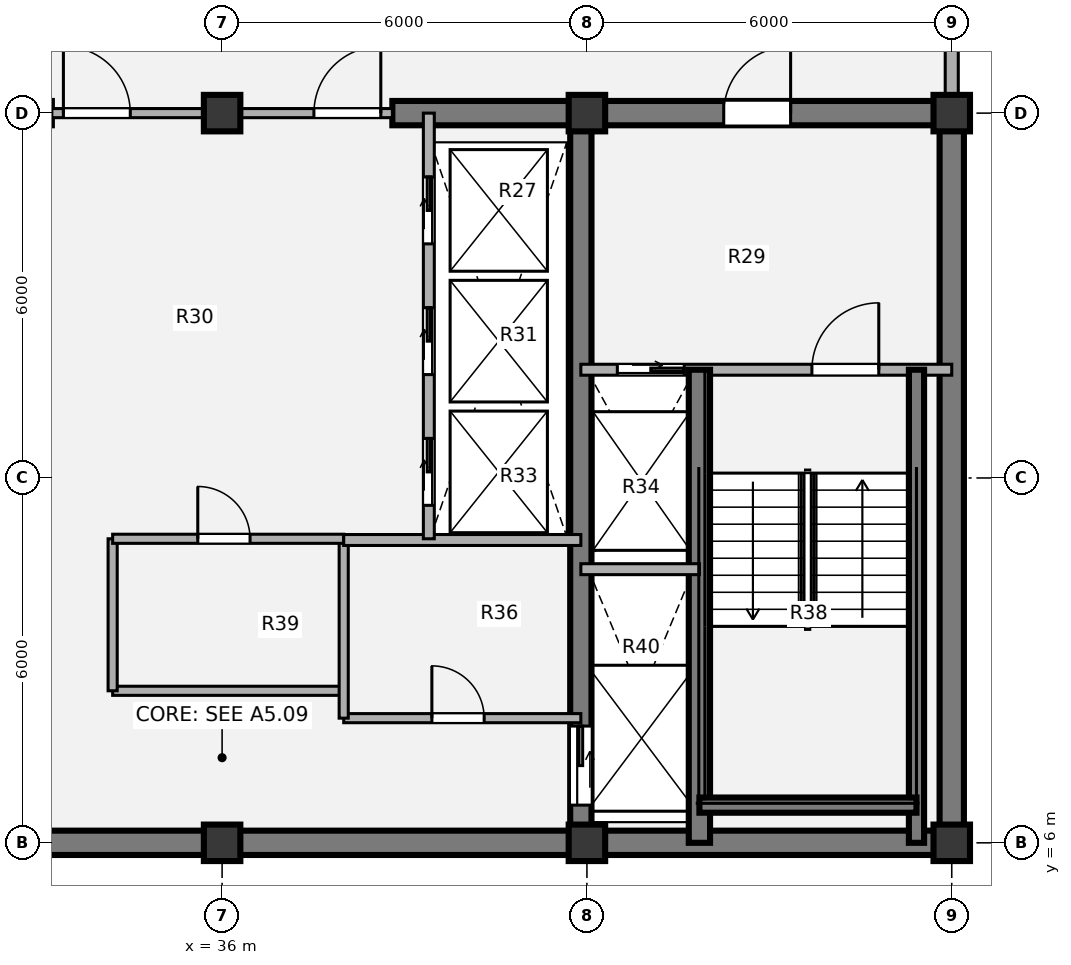
"""IFC4 building model, lengths in metres.
Left out: names, types, materials, properties, quantities, classifications, styles, units other than length and angle.
Written with IfcOpenShell. Run it as: python <this file> out.ifc"""

import sys

from ifc_helpers import new_model, si_unit, direction, frame, frame_2d, origin, origin_2d, place, context, subcontext, project, spatial, rectangle, extrude, source, transform, mapped, element, fill, save


model = new_model("IFC4")
c1 = context("Model", 3, precision=1e-05, world=origin(), true_north=direction((0.0, 1.0)))
c2 = subcontext(c1, "Body", "Model", "MODEL_VIEW")
j1 = project(units=[si_unit("LENGTHUNIT", "METRE"), si_unit("PLANEANGLEUNIT", "RADIAN")], contexts=[c1])
p1 = place(None, origin())
s1 = spatial("IfcSite", under=j1, at=p1, CompositionType="ELEMENT")
p2 = place(p1, origin())
s2 = spatial("IfcBuilding", under=s1, at=p2, CompositionType="ELEMENT")
p3 = place(p2, frame((0.0, 0.0, 238.14)))
s3 = spatial("IfcBuildingStorey", under=s2, at=p3, CompositionType="ELEMENT", Elevation=238.14)
m1 = source(origin(), c2, "Body", "SweptSolid", [
    extrude(rectangle(XDim=0.6, YDim=0.6, at=origin_2d()), origin(), (0.0, 0.0, 1.0), 3.78),
])
for number, where, z_axis, x_axis in (
    (1, (36.0, 6.0, 0.0), (0.0, 0.0, 1.0), (1.0, 0.0, 0.0)),
    (2, (42.0, 6.0, 0.0), (0.0, 0.0, 1.0), (1.0, 0.0, 0.0)),
    (3, (48.0, 6.0, 0.0), (0.0, 0.0, 1.0), (1.0, 0.0, 0.0)),
    (4, (36.0, 18.0, 0.0), (0.0, 0.0, 1.0), (1.0, 0.0, 0.0)),
    (5, (42.0, 18.0, 0.0), (0.0, 0.0, 1.0), (1.0, 0.0, 0.0)),
    (6, (48.0, 18.0, 0.0), (0.0, 0.0, 1.0), (1.0, 0.0, 0.0)),
):
    element("IfcColumn", number, at=place(p3, frame(where, z_axis=z_axis, x_axis=x_axis)), inside=s3, PredefinedType="COLUMN", context=c2, shape_type="MappedRepresentation", body=[
        mapped(m1, transform((0.0, 0.0, 0.0), x_axis=(1.0, 0.0, 0.0), y_axis=(0.0, 1.0, 0.0), z_axis=(0.0, 0.0, 1.0), scale=1.0)),
    ])
p4 = place(p3, frame((48.2, 6.0, 0.0), z_axis=(0.0, 0.0, 1.0), x_axis=(-1.0, 0.0, 0.0)))
e7 = element("IfcWall", 7, at=p4, inside=s3, PredefinedType="SHEAR", context=c2, shape_type="SweptSolid", body=[
    extrude(rectangle(XDim=24.4, YDim=0.4, at=frame_2d((12.2, 0.0))), origin(), (0.0, 0.0, 1.0), 3.78),
])
p5 = place(p3, frame((48.0, 18.0, 0.0), z_axis=(0.0, 0.0, 1.0), x_axis=(0.0, -1.0, 0.0)))
e8 = element("IfcWall", 8, at=p5, inside=s3, PredefinedType="SHEAR", context=c2, shape_type="SweptSolid", body=[
    extrude(rectangle(XDim=12.0, YDim=0.4, at=frame_2d((6.0, 0.0))), origin(), (0.0, 0.0, 1.0), 3.78),
])
p6 = place(p3, frame((38.8, 18.0, 0.0), z_axis=(0.0, 0.0, 1.0), x_axis=(1.0, 0.0, 0.0)))
e9 = element("IfcWall", 9, at=p6, inside=s3, PredefinedType="SHEAR", context=c2, shape_type="SweptSolid", body=[
    extrude(rectangle(XDim=9.4, YDim=0.4, at=frame_2d((4.7, 0.0))), origin(), (0.0, 0.0, 1.0), 3.78),
])
p7 = place(p6, frame((5.45, 0.0, 0.0)))
e10 = element("IfcOpeningElement", 10, at=p7, cuts=e9, PredefinedType="OPENING", context=c2, shape_type="SweptSolid", body=[
    extrude(rectangle(XDim=1.1, YDim=2.1, at=origin_2d()), frame((0.55, 0.21, 1.05), z_axis=(0.0, -1.0, 0.0), x_axis=(1.0, 0.0, 0.0)), (0.0, 0.0, 1.0), 0.42),
])
p8 = place(p3, frame((41.9, 18.0, 0.0), z_axis=(0.0, 0.0, 1.0), x_axis=(0.0, -1.0, 0.0)))
e11 = element("IfcWall", 11, at=p8, inside=s3, PredefinedType="SHEAR", context=c2, shape_type="SweptSolid", body=[
    extrude(rectangle(XDim=12.0, YDim=0.35, at=frame_2d((6.0, 0.0))), origin(), (0.0, 0.0, 1.0), 3.78),
])
p9 = place(p8, frame((10.08, 0.0, 0.0)))
e12 = element("IfcOpeningElement", 12, at=p9, cuts=e11, PredefinedType="OPENING", context=c2, shape_type="SweptSolid", body=[
    extrude(rectangle(XDim=1.3, YDim=2.1, at=origin_2d()), frame((0.65, 0.185, 1.05), z_axis=(0.0, -1.0, 0.0), x_axis=(1.0, 0.0, 0.0)), (0.0, 0.0, 1.0), 0.37),
])
p10 = place(p3, frame((48.0, 21.05, 0.0), z_axis=(0.0, 0.0, 1.0), x_axis=(0.0, -1.0, 0.0)))
e13 = element("IfcWall", 13, at=p10, inside=s3, PredefinedType="SOLIDWALL", context=c2, shape_type="SweptSolid", body=[
    extrude(rectangle(XDim=2.77, YDim=0.215, at=frame_2d((1.385, 0.0))), origin(), (0.0, 0.0, 1.0), 2.718),
])
p11 = place(p3, frame((34.2, 8.5, 0.0), z_axis=(0.0, 0.0, 1.0), x_axis=(1.0, 0.0, 0.0)))
e14 = element("IfcWall", 14, at=p11, inside=s3, PredefinedType="PARTITIONING", context=c2, shape_type="SweptSolid", body=[
    extrude(rectangle(XDim=3.8, YDim=0.15, at=frame_2d((1.9, 0.0))), origin(), (0.0, 0.0, 1.0), 3.5),
])
p12 = place(p3, frame((38.0, 8.05, 0.0), z_axis=(0.0, 0.0, 1.0), x_axis=(1.0, 0.0, 0.0)))
e15 = element("IfcWall", 15, at=p12, inside=s3, PredefinedType="PARTITIONING", context=c2, shape_type="SweptSolid", body=[
    extrude(rectangle(XDim=3.9, YDim=0.15, at=frame_2d((1.95, 0.0))), origin(), (0.0, 0.0, 1.0), 3.5),
])
p13 = place(p12, frame((1.45, 0.0, 0.0)))
e16 = element("IfcOpeningElement", 16, at=p13, cuts=e15, PredefinedType="OPENING", context=c2, shape_type="SweptSolid", body=[
    extrude(rectangle(XDim=0.86, YDim=2.1, at=origin_2d()), frame((0.43, 0.085, 1.05), z_axis=(0.0, -1.0, 0.0), x_axis=(1.0, 0.0, 0.0)), (0.0, 0.0, 1.0), 0.17),
])
p14 = place(p3, frame((34.2, 8.5, 0.0), z_axis=(0.0, 0.0, 1.0), x_axis=(0.0, 1.0, 0.0)))
e17 = element("IfcWall", 17, at=p14, inside=s3, PredefinedType="PARTITIONING", context=c2, shape_type="SweptSolid", body=[
    extrude(rectangle(XDim=2.5, YDim=0.15, at=frame_2d((1.25, 0.0))), origin(), (0.0, 0.0, 1.0), 3.5),
])
p15 = place(p3, frame((38.0, 8.05, 0.0), z_axis=(0.0, 0.0, 1.0), x_axis=(0.0, 1.0, 0.0)))
e18 = element("IfcWall", 18, at=p15, inside=s3, PredefinedType="PARTITIONING", context=c2, shape_type="SweptSolid", body=[
    extrude(rectangle(XDim=2.95, YDim=0.15, at=frame_2d((1.475, 0.0))), origin(), (0.0, 0.0, 1.0), 3.5),
])
p16 = place(p3, frame((34.2, 11.0, 0.0), z_axis=(0.0, 0.0, 1.0), x_axis=(1.0, 0.0, 0.0)))
e19 = element("IfcWall", 19, at=p16, inside=s3, PredefinedType="PARTITIONING", context=c2, shape_type="SweptSolid", body=[
    extrude(rectangle(XDim=3.8, YDim=0.15, at=frame_2d((1.9, 0.0))), origin(), (0.0, 0.0, 1.0), 3.5),
])
p17 = place(p16, frame((1.4, 0.0, 0.0)))
e20 = element("IfcOpeningElement", 20, at=p17, cuts=e19, PredefinedType="OPENING", context=c2, shape_type="SweptSolid", body=[
    extrude(rectangle(XDim=0.86, YDim=2.1, at=origin_2d()), frame((0.43, 0.085, 1.05), z_axis=(0.0, -1.0, 0.0), x_axis=(1.0, 0.0, 0.0)), (0.0, 0.0, 1.0), 0.17),
])
p18 = place(p3, frame((38.0, 10.98, 0.0), z_axis=(0.0, 0.0, 1.0), x_axis=(1.0, 0.0, 0.0)))
e21 = element("IfcWall", 21, at=p18, inside=s3, PredefinedType="PARTITIONING", context=c2, shape_type="SweptSolid", body=[
    extrude(rectangle(XDim=3.9, YDim=0.18, at=frame_2d((1.95, 0.0))), origin(), (0.0, 0.0, 1.0), 3.5),
])
p19 = place(p3, frame((33.2, 18.0, 0.0), z_axis=(0.0, 0.0, 1.0), x_axis=(1.0, 0.0, 0.0)))
e22 = element("IfcWall", 22, at=p19, inside=s3, PredefinedType="PARTITIONING", context=c2, shape_type="SweptSolid", body=[
    extrude(rectangle(XDim=5.6, YDim=0.15, at=frame_2d((2.8, 0.0))), origin(), (0.0, 0.0, 1.0), 2.515),
])
p20 = place(p19, frame((0.19, 0.0, 0.0)))
e23 = element("IfcOpeningElement", 23, at=p20, cuts=e22, PredefinedType="OPENING", context=c2, shape_type="SweptSolid", body=[
    extrude(rectangle(XDim=1.1, YDim=2.1, at=origin_2d()), frame((0.55, 0.085, 1.05), z_axis=(0.0, -1.0, 0.0), x_axis=(1.0, 0.0, 0.0)), (0.0, 0.0, 1.0), 0.17),
])
p21 = place(p19, frame((4.31, 0.0, 0.0)))
e24 = element("IfcOpeningElement", 24, at=p21, cuts=e22, PredefinedType="OPENING", context=c2, shape_type="SweptSolid", body=[
    extrude(rectangle(XDim=1.1, YDim=2.1, at=origin_2d()), frame((0.55, 0.085, 1.05), z_axis=(0.0, -1.0, 0.0), x_axis=(1.0, 0.0, 0.0)), (0.0, 0.0, 1.0), 0.17),
])
p22 = place(p3, frame((41.9, 13.78, 0.0), z_axis=(0.0, 0.0, 1.0), x_axis=(1.0, 0.0, 0.0)))
e25 = element("IfcWall", 25, at=p22, inside=s3, PredefinedType="PARTITIONING", context=c2, shape_type="SweptSolid", body=[
    extrude(rectangle(XDim=6.1, YDim=0.18, at=frame_2d((3.05, 0.0))), origin(), (0.0, 0.0, 1.0), 3.5),
])
p23 = place(p22, frame((0.6, 0.0, 0.0)))
e26 = element("IfcOpeningElement", 26, at=p23, cuts=e25, PredefinedType="OPENING", context=c2, shape_type="SweptSolid", body=[
    extrude(rectangle(XDim=1.1, YDim=2.1, at=origin_2d()), frame((0.55, 0.1, 1.05), z_axis=(0.0, -1.0, 0.0), x_axis=(1.0, 0.0, 0.0)), (0.0, 0.0, 1.0), 0.2),
])
p24 = place(p22, frame((3.8, 0.0, 0.0)))
e27 = element("IfcOpeningElement", 27, at=p24, cuts=e25, PredefinedType="OPENING", context=c2, shape_type="SweptSolid", body=[
    extrude(rectangle(XDim=1.1, YDim=2.1, at=origin_2d()), frame((0.55, 0.1, 1.05), z_axis=(0.0, -1.0, 0.0), x_axis=(1.0, 0.0, 0.0)), (0.0, 0.0, 1.0), 0.2),
])
p25 = place(p3, frame((43.85, 6.0, 0.0), z_axis=(0.0, 0.0, 1.0), x_axis=(0.0, 1.0, 0.0)))
e28 = element("IfcWall", 28, at=p25, inside=s3, PredefinedType="SHEAR", context=c2, shape_type="SweptSolid", body=[
    extrude(rectangle(XDim=7.78, YDim=0.35, at=frame_2d((3.89, 0.0))), origin(), (0.0, 0.0, 1.0), 3.85),
])
p26 = place(p3, frame((47.42, 6.0, 0.0), z_axis=(0.0, 0.0, 1.0), x_axis=(0.0, 1.0, 0.0)))
e29 = element("IfcWall", 29, at=p26, inside=s3, PredefinedType="SHEAR", context=c2, shape_type="SweptSolid", body=[
    extrude(rectangle(XDim=7.78, YDim=0.25, at=frame_2d((3.89, 0.0))), origin(), (0.0, 0.0, 1.0), 3.85),
])
p27 = place(p3, frame((43.85, 6.62, 0.0), z_axis=(0.0, 0.0, 1.0), x_axis=(1.0, 0.0, 0.0)))
e30 = element("IfcWall", 30, at=p27, inside=s3, PredefinedType="SHEAR", context=c2, shape_type="SweptSolid", body=[
    extrude(rectangle(XDim=3.57, YDim=0.25, at=frame_2d((1.785, 0.0))), origin(), (0.0, 0.0, 1.0), 3.85),
])
p28 = place(p3, frame((41.9, 10.5, 0.0), z_axis=(0.0, 0.0, 1.0), x_axis=(1.0, 0.0, 0.0)))
e31 = element("IfcWall", 31, at=p28, inside=s3, PredefinedType="PARTITIONING", context=c2, shape_type="SweptSolid", body=[
    extrude(rectangle(XDim=1.95, YDim=0.18, at=frame_2d((0.975, 0.0))), origin(), (0.0, 0.0, 1.0), 3.5),
])
p29 = place(p3, frame((39.4, 11.0, 0.0), z_axis=(0.0, 0.0, 1.0), x_axis=(0.0, 1.0, 0.0)))
e32 = element("IfcWall", 32, at=p29, inside=s3, PredefinedType="PARTITIONING", context=c2, shape_type="SweptSolid", body=[
    extrude(rectangle(XDim=7.0, YDim=0.18, at=frame_2d((3.5, 0.0))), origin(), (0.0, 0.0, 1.0), 3.5),
])
p30 = place(p29, frame((0.55, 0.0, 0.0)))
e33 = element("IfcOpeningElement", 33, at=p30, cuts=e32, PredefinedType="OPENING", context=c2, shape_type="SweptSolid", body=[
    extrude(rectangle(XDim=1.1, YDim=2.1, at=origin_2d()), frame((0.55, 0.1, 1.05), z_axis=(0.0, -1.0, 0.0), x_axis=(1.0, 0.0, 0.0)), (0.0, 0.0, 1.0), 0.2),
])
p31 = place(p29, frame((2.7, 0.0, 0.0)))
e34 = element("IfcOpeningElement", 34, at=p31, cuts=e32, PredefinedType="OPENING", context=c2, shape_type="SweptSolid", body=[
    extrude(rectangle(XDim=1.1, YDim=2.1, at=origin_2d()), frame((0.55, 0.1, 1.05), z_axis=(0.0, -1.0, 0.0), x_axis=(1.0, 0.0, 0.0)), (0.0, 0.0, 1.0), 0.2),
])
p32 = place(p29, frame((4.85, 0.0, 0.0)))
e35 = element("IfcOpeningElement", 35, at=p32, cuts=e32, PredefinedType="OPENING", context=c2, shape_type="SweptSolid", body=[
    extrude(rectangle(XDim=1.1, YDim=2.1, at=origin_2d()), frame((0.55, 0.1, 1.05), z_axis=(0.0, -1.0, 0.0), x_axis=(1.0, 0.0, 0.0)), (0.0, 0.0, 1.0), 0.2),
])
m2 = source(origin(), c2, "Body", "SweptSolid", [
    extrude(rectangle(XDim=0.86, YDim=2.1, at=origin_2d()), frame((0.43, 0.025, 1.05), z_axis=(0.0, -1.0, 0.0), x_axis=(1.0, 0.0, 0.0)), (0.0, 0.0, 1.0), 0.05),
])
p33 = place(p13, origin())
e36 = element("IfcDoor", 36, at=p33, inside=s3, OperationType="SINGLE_SWING_LEFT", PredefinedType="DOOR", context=c2, shape_type="MappedRepresentation", body=[
    mapped(m2, transform((0.0, 0.0, 0.0), x_axis=(1.0, 0.0, 0.0), y_axis=(0.0, 1.0, 0.0), z_axis=(0.0, 0.0, 1.0), scale=1.0)),
])
fill(e16, e36)
p34 = place(p17, origin())
e37 = element("IfcDoor", 37, at=p34, inside=s3, OperationType="SINGLE_SWING_LEFT", PredefinedType="DOOR", context=c2, shape_type="MappedRepresentation", body=[
    mapped(m2, transform((0.0, 0.0, 0.0), x_axis=(1.0, 0.0, 0.0), y_axis=(0.0, 1.0, 0.0), z_axis=(0.0, 0.0, 1.0), scale=1.0)),
])
fill(e20, e37)
m3 = source(origin(), c2, "Body", "SweptSolid", [
    extrude(rectangle(XDim=1.1, YDim=2.1, at=origin_2d()), frame((0.55, 0.025, 1.05), z_axis=(0.0, -1.0, 0.0), x_axis=(1.0, 0.0, 0.0)), (0.0, 0.0, 1.0), 0.05),
])
p35 = place(p20, origin())
e38 = element("IfcDoor", 38, at=p35, inside=s3, OperationType="SINGLE_SWING_LEFT", PredefinedType="DOOR", context=c2, shape_type="MappedRepresentation", body=[
    mapped(m3, transform((0.0, 0.0, 0.0), x_axis=(1.0, 0.0, 0.0), y_axis=(0.0, 1.0, 0.0), z_axis=(0.0, 0.0, 1.0), scale=1.0)),
])
fill(e23, e38)
p36 = place(p21, origin())
e39 = element("IfcDoor", 39, at=p36, inside=s3, OperationType="SINGLE_SWING_RIGHT", PredefinedType="DOOR", context=c2, shape_type="MappedRepresentation", body=[
    mapped(m3, transform((0.0, 0.0, 0.0), x_axis=(1.0, 0.0, 0.0), y_axis=(0.0, 1.0, 0.0), z_axis=(0.0, 0.0, 1.0), scale=1.0)),
])
fill(e24, e39)
m4 = source(origin(), c2, "Body", "SweptSolid", [
    extrude(rectangle(XDim=1.1, YDim=2.1, at=origin_2d()), frame((0.55, 0.025, 1.05), z_axis=(0.0, -1.0, 0.0), x_axis=(1.0, 0.0, 0.0)), (0.0, 0.0, 1.0), 0.05),
])
p37 = place(p23, origin())
e40 = element("IfcDoor", 40, at=p37, inside=s3, OperationType="SLIDING_TO_RIGHT", PredefinedType="DOOR", context=c2, shape_type="MappedRepresentation", body=[
    mapped(m4, transform((0.0, 0.0, 0.0), x_axis=(1.0, 0.0, 0.0), y_axis=(0.0, 1.0, 0.0), z_axis=(0.0, 0.0, 1.0), scale=1.0)),
])
fill(e26, e40)
m5 = source(origin(), c2, "Body", "SweptSolid", [
    extrude(rectangle(XDim=1.1, YDim=2.1, at=origin_2d()), frame((0.55, 0.025, 1.05), z_axis=(0.0, -1.0, 0.0), x_axis=(1.0, 0.0, 0.0)), (0.0, 0.0, 1.0), 0.05),
])
p38 = place(p24, origin())
e41 = element("IfcDoor", 41, at=p38, inside=s3, OperationType="SINGLE_SWING_RIGHT", PredefinedType="DOOR", context=c2, shape_type="MappedRepresentation", body=[
    mapped(m5, transform((0.0, 0.0, 0.0), x_axis=(1.0, 0.0, 0.0), y_axis=(0.0, 1.0, 0.0), z_axis=(0.0, 0.0, 1.0), scale=1.0)),
])
fill(e27, e41)
m6 = source(origin(), c2, "Body", "SweptSolid", [
    extrude(rectangle(XDim=1.3, YDim=2.1, at=origin_2d()), frame((0.65, 0.025, 1.05), z_axis=(0.0, -1.0, 0.0), x_axis=(1.0, 0.0, 0.0)), (0.0, 0.0, 1.0), 0.05),
])
p39 = place(p9, origin())
e42 = element("IfcDoor", 42, at=p39, inside=s3, OperationType="SLIDING_TO_LEFT", PredefinedType="DOOR", context=c2, shape_type="MappedRepresentation", body=[
    mapped(m6, transform((0.0, 0.0, 0.0), x_axis=(1.0, 0.0, 0.0), y_axis=(0.0, 1.0, 0.0), z_axis=(0.0, 0.0, 1.0), scale=1.0)),
])
fill(e12, e42)
p40 = place(p7, origin())
e43 = element("IfcDoor", 43, at=p40, inside=s3, OperationType="SINGLE_SWING_RIGHT", PredefinedType="DOOR", context=c2, shape_type="MappedRepresentation", body=[
    mapped(m3, transform((0.0, 0.0, 0.0), x_axis=(1.0, 0.0, 0.0), y_axis=(0.0, 1.0, 0.0), z_axis=(0.0, 0.0, 1.0), scale=1.0)),
])
fill(e10, e43)
p41 = place(p30, origin())
e44 = element("IfcDoor", 44, at=p41, inside=s3, OperationType="SLIDING_TO_RIGHT", PredefinedType="DOOR", context=c2, shape_type="MappedRepresentation", body=[
    mapped(m4, transform((0.0, 0.0, 0.0), x_axis=(1.0, 0.0, 0.0), y_axis=(0.0, 1.0, 0.0), z_axis=(0.0, 0.0, 1.0), scale=1.0)),
])
fill(e33, e44)
p42 = place(p31, origin())
e45 = element("IfcDoor", 45, at=p42, inside=s3, OperationType="SLIDING_TO_RIGHT", PredefinedType="DOOR", context=c2, shape_type="MappedRepresentation", body=[
    mapped(m4, transform((0.0, 0.0, 0.0), x_axis=(1.0, 0.0, 0.0), y_axis=(0.0, 1.0, 0.0), z_axis=(0.0, 0.0, 1.0), scale=1.0)),
])
fill(e34, e45)
p43 = place(p32, origin())
e46 = element("IfcDoor", 46, at=p43, inside=s3, OperationType="SLIDING_TO_RIGHT", PredefinedType="DOOR", context=c2, shape_type="MappedRepresentation", body=[
    mapped(m4, transform((0.0, 0.0, 0.0), x_axis=(1.0, 0.0, 0.0), y_axis=(0.0, 1.0, 0.0), z_axis=(0.0, 0.0, 1.0), scale=1.0)),
])
fill(e35, e46)
save(model, sys.argv[1])
